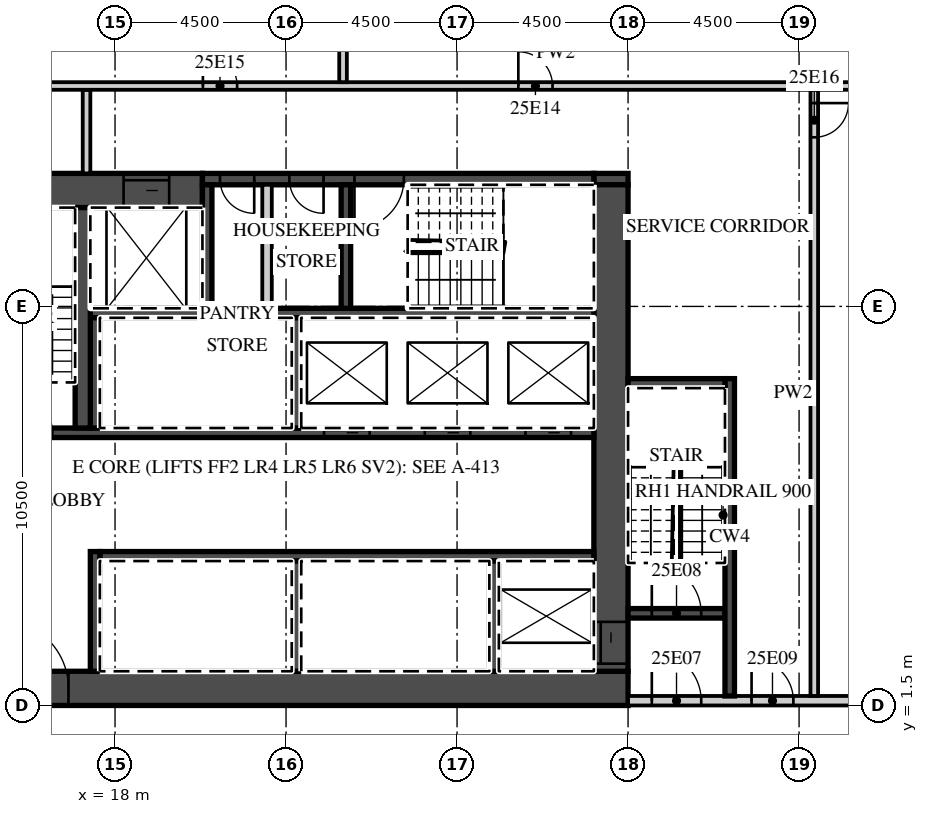
"""IFC4 building model, lengths in metres.
Left out: names, types, materials, properties, quantities, classifications, styles, units other than length and angle.
Written with IfcOpenShell. Run it as: python <this file> out.ifc"""

import sys

from ifc_helpers import new_model, si_unit, direction, frame, frame_2d, origin, place, context, subcontext, project, spatial, rectangle, extrude, element, fill, save


model = new_model("IFC4")
c1 = context("Model", 3, precision=1e-05, world=origin(), true_north=direction((0.0, 1.0)))
c2 = subcontext(c1, "Body", "Model", "MODEL_VIEW")
j1 = project(units=[si_unit("LENGTHUNIT", "METRE"), si_unit("PLANEANGLEUNIT", "RADIAN")], contexts=[c1])
p1 = place(None, origin())
s1 = spatial("IfcSite", under=j1, at=p1, CompositionType="ELEMENT")
p2 = place(p1, origin())
s2 = spatial("IfcBuilding", under=s1, at=p2, CompositionType="ELEMENT")
p3 = place(p2, frame((0.0, 0.0, 117.4)))
s3 = spatial("IfcBuildingStorey", under=s2, at=p3, CompositionType="ELEMENT", Elevation=117.4)
p4 = place(p3, frame((13.5, 1.95, 0.0), z_axis=(0.0, 0.0, 1.0), x_axis=(1.0, 0.0, 0.0)))
e1 = element("IfcWall", 1, at=p4, inside=s3, PredefinedType="SHEAR", context=c2, shape_type="SweptSolid", body=[
    extrude(rectangle(XDim=18.0, YDim=0.9, at=frame_2d((9.0, 0.0))), origin(), (0.0, 0.0, 1.0), 3.02),
])
p5 = place(p4, frame((1.475, 0.0, 0.0)))
e2 = element("IfcOpeningElement", 2, at=p5, cuts=e1, PredefinedType="OPENING", context=c2, shape_type="SweptSolid", body=[
    extrude(rectangle(XDim=1.8, YDim=2.1, at=frame_2d((0.9, 1.05))), frame((0.0, 0.46, 0.0), z_axis=(0.0, -1.0, 0.0), x_axis=(1.0, 0.0, 0.0)), (0.0, 0.0, 1.0), 0.92),
])
p6 = place(p3, frame((13.5, 15.05, 0.0), z_axis=(0.0, 0.0, 1.0), x_axis=(1.0, 0.0, 0.0)))
e3 = element("IfcWall", 3, at=p6, inside=s3, PredefinedType="SHEAR", context=c2, shape_type="SweptSolid", body=[
    extrude(rectangle(XDim=6.8, YDim=0.9, at=frame_2d((3.4, 0.0))), origin(), (0.0, 0.0, 1.0), 3.02),
])
p7 = place(p6, frame((4.725, 0.0, 0.0)))
e4 = element("IfcOpeningElement", 4, at=p7, cuts=e3, PredefinedType="OPENING", context=c2, shape_type="SweptSolid", body=[
    extrude(rectangle(XDim=1.2, YDim=2.1, at=frame_2d((0.6, 1.05))), frame((0.0, 0.46, 0.0), z_axis=(0.0, -1.0, 0.0), x_axis=(1.0, 0.0, 0.0)), (0.0, 0.0, 1.0), 0.92),
])
p8 = place(p3, frame((30.6, 15.35, 0.0), z_axis=(0.0, 0.0, 1.0), x_axis=(1.0, 0.0, 0.0)))
e5 = element("IfcWall", 5, at=p8, inside=s3, PredefinedType="SHEAR", context=c2, shape_type="SweptSolid", body=[
    extrude(rectangle(XDim=0.9, YDim=0.3, at=frame_2d((0.45, 0.0))), origin(), (0.0, 0.0, 1.0), 3.02),
])
p9 = place(p3, frame((20.3, 15.35, 0.0), z_axis=(0.0, 0.0, 1.0), x_axis=(1.0, 0.0, 0.0)))
e6 = element("IfcWall", 6, at=p9, inside=s3, PredefinedType="SHEAR", context=c2, shape_type="SweptSolid", body=[
    extrude(rectangle(XDim=10.3, YDim=0.3, at=frame_2d((5.15, 0.0))), origin(), (0.0, 0.0, 1.0), 3.02),
])
p10 = place(p9, frame((4.0, 0.0, 0.0)))
e7 = element("IfcOpeningElement", 7, at=p10, cuts=e6, PredefinedType="OPENING", context=c2, shape_type="SweptSolid", body=[
    extrude(rectangle(XDim=1.3, YDim=2.1, at=frame_2d((0.65, 1.05))), frame((0.0, 0.16, 0.0), z_axis=(0.0, -1.0, 0.0), x_axis=(1.0, 0.0, 0.0)), (0.0, 0.0, 1.0), 0.32),
])
p11 = place(p9, frame((2.288, 0.0, 0.0)))
e8 = element("IfcOpeningElement", 8, at=p11, cuts=e6, PredefinedType="OPENING", context=c2, shape_type="SweptSolid", body=[
    extrude(rectangle(XDim=0.9, YDim=2.1, at=frame_2d((0.45, 1.05))), frame((0.0, 0.16, 0.0), z_axis=(0.0, -1.0, 0.0), x_axis=(1.0, 0.0, 0.0)), (0.0, 0.0, 1.0), 0.32),
])
p12 = place(p9, frame((0.462, 0.0, 0.0)))
e9 = element("IfcOpeningElement", 9, at=p12, cuts=e6, PredefinedType="OPENING", context=c2, shape_type="SweptSolid", body=[
    extrude(rectangle(XDim=0.9, YDim=2.1, at=frame_2d((0.45, 1.05))), frame((0.0, 0.16, 0.0), z_axis=(0.0, -1.0, 0.0), x_axis=(1.0, 0.0, 0.0)), (0.0, 0.0, 1.0), 0.32),
])
p13 = place(p3, frame((31.05, 2.4, 0.0), z_axis=(0.0, 0.0, 1.0), x_axis=(0.0, 1.0, 0.0)))
e10 = element("IfcWall", 10, at=p13, inside=s3, PredefinedType="SHEAR", context=c2, shape_type="SweptSolid", body=[
    extrude(rectangle(XDim=12.8, YDim=0.9, at=frame_2d((6.4, 0.0))), origin(), (0.0, 0.0, 1.0), 3.02),
])
p14 = place(p13, frame((0.2, 0.0, 0.0)))
e11 = element("IfcOpeningElement", 11, at=p14, cuts=e10, PredefinedType="OPENING", context=c2, shape_type="SweptSolid", body=[
    extrude(rectangle(XDim=1.1, YDim=2.1, at=frame_2d((0.55, 1.05))), frame((0.0, 0.46, 0.0), z_axis=(0.0, -1.0, 0.0), x_axis=(1.0, 0.0, 0.0)), (0.0, 0.0, 1.0), 0.92),
])
p15 = place(p3, frame((17.6, 5.425, 0.0), z_axis=(0.0, 0.0, 1.0), x_axis=(1.0, 0.0, 0.0)))
e12 = element("IfcWall", 12, at=p15, inside=s3, PredefinedType="SHEAR", context=c2, shape_type="SweptSolid", body=[
    extrude(rectangle(XDim=13.0, YDim=0.25, at=frame_2d((6.5, 0.0))), origin(), (0.0, 0.0, 1.0), 3.02),
])
p16 = place(p3, frame((17.475, 2.4, 0.0), z_axis=(0.0, 0.0, 1.0), x_axis=(0.0, 1.0, 0.0)))
e13 = element("IfcWall", 13, at=p16, inside=s3, PredefinedType="SHEAR", context=c2, shape_type="SweptSolid", body=[
    extrude(rectangle(XDim=3.15, YDim=0.25, at=frame_2d((1.575, 0.0))), origin(), (0.0, 0.0, 1.0), 3.02),
])
for number, where, z_axis, x_axis in (
    (14, (27.975, 2.4, 0.0), (0.0, 0.0, 1.0), (0.0, 1.0, 0.0)),
    (15, (22.775, 2.4, 0.0), (0.0, 0.0, 1.0), (0.0, 1.0, 0.0)),
):
    element("IfcWall", number, at=place(p3, frame(where, z_axis=z_axis, x_axis=x_axis)), inside=s3, PredefinedType="SHEAR", context=c2, shape_type="SweptSolid", body=[
        extrude(rectangle(XDim=2.9, YDim=0.25, at=frame_2d((1.45, 0.0))), origin(), (0.0, 0.0, 1.0), 3.02),
    ])
p17 = place(p3, frame((14.4, 8.675, 0.0), z_axis=(0.0, 0.0, 1.0), x_axis=(1.0, 0.0, 0.0)))
e16 = element("IfcWall", 16, at=p17, inside=s3, PredefinedType="SHEAR", context=c2, shape_type="SweptSolid", body=[
    extrude(rectangle(XDim=16.2, YDim=0.25, at=frame_2d((8.1, 0.0))), origin(), (0.0, 0.0, 1.0), 3.02),
])
p18 = place(p17, frame((14.4, 0.0, 0.0)))
e17 = element("IfcOpeningElement", 17, at=p18, cuts=e16, PredefinedType="OPENING", context=c2, shape_type="SweptSolid", body=[
    extrude(rectangle(XDim=1.2, YDim=2.1, at=frame_2d((0.6, 1.05))), frame((0.0, 0.135, 0.0), z_axis=(0.0, -1.0, 0.0), x_axis=(1.0, 0.0, 0.0)), (0.0, 0.0, 1.0), 0.27),
])
p19 = place(p17, frame((11.75, 0.0, 0.0)))
e18 = element("IfcOpeningElement", 18, at=p19, cuts=e16, PredefinedType="OPENING", context=c2, shape_type="SweptSolid", body=[
    extrude(rectangle(XDim=1.2, YDim=2.1, at=frame_2d((0.6, 1.05))), frame((0.0, 0.135, 0.0), z_axis=(0.0, -1.0, 0.0), x_axis=(1.0, 0.0, 0.0)), (0.0, 0.0, 1.0), 0.27),
])
p20 = place(p17, frame((9.1, 0.0, 0.0)))
e19 = element("IfcOpeningElement", 19, at=p20, cuts=e16, PredefinedType="OPENING", context=c2, shape_type="SweptSolid", body=[
    extrude(rectangle(XDim=1.2, YDim=2.1, at=frame_2d((0.6, 1.05))), frame((0.0, 0.135, 0.0), z_axis=(0.0, -1.0, 0.0), x_axis=(1.0, 0.0, 0.0)), (0.0, 0.0, 1.0), 0.27),
])
p21 = place(p17, frame((0.65, 0.0, 0.0)))
e20 = element("IfcOpeningElement", 20, at=p21, cuts=e16, PredefinedType="OPENING", context=c2, shape_type="SweptSolid", body=[
    extrude(rectangle(XDim=1.3, YDim=2.1, at=frame_2d((0.65, 1.05))), frame((0.0, 0.135, 0.0), z_axis=(0.0, -1.0, 0.0), x_axis=(1.0, 0.0, 0.0)), (0.0, 0.0, 1.0), 0.27),
])
p22 = place(p3, frame((17.35, 11.825, 0.0), z_axis=(0.0, 0.0, 1.0), x_axis=(1.0, 0.0, 0.0)))
e21 = element("IfcWall", 21, at=p22, inside=s3, PredefinedType="SHEAR", context=c2, shape_type="SweptSolid", body=[
    extrude(rectangle(XDim=13.25, YDim=0.25, at=frame_2d((6.625, 0.0))), origin(), (0.0, 0.0, 1.0), 3.02),
])
for number, where, z_axis, x_axis in (
    (22, (17.475, 8.8, 0.0), (0.0, 0.0, 1.0), (0.0, 1.0, 0.0)),
    (23, (22.775, 8.8, 0.0), (0.0, 0.0, 1.0), (0.0, 1.0, 0.0)),
):
    element("IfcWall", number, at=place(p3, frame(where, z_axis=z_axis, x_axis=x_axis)), inside=s3, PredefinedType="SHEAR", context=c2, shape_type="SweptSolid", body=[
        extrude(rectangle(XDim=2.9, YDim=0.25, at=frame_2d((1.45, 0.0))), origin(), (0.0, 0.0, 1.0), 3.02),
    ])
p23 = place(p3, frame((17.15, 8.8, 0.0), z_axis=(0.0, 0.0, 1.0), x_axis=(0.0, 1.0, 0.0)))
e24 = element("IfcWall", 24, at=p23, inside=s3, PredefinedType="SHEAR", context=c2, shape_type="SweptSolid", body=[
    extrude(rectangle(XDim=5.8, YDim=0.4, at=frame_2d((2.9, 0.0))), origin(), (0.0, 0.0, 1.0), 3.02),
])
for number, where, z_axis, x_axis in (
    (25, (20.425, 11.95, 0.0), (0.0, 0.0, 1.0), (0.0, 1.0, 0.0)),
    (26, (24.075, 11.95, 0.0), (0.0, 0.0, 1.0), (0.0, 1.0, 0.0)),
):
    element("IfcWall", number, at=place(p3, frame(where, z_axis=z_axis, x_axis=x_axis)), inside=s3, PredefinedType="SHEAR", context=c2, shape_type="SweptSolid", body=[
        extrude(rectangle(XDim=3.25, YDim=0.25, at=frame_2d((1.625, 0.0))), origin(), (0.0, 0.0, 1.0), 3.02),
    ])
p24 = place(p3, frame((22.0, 11.95, 0.0), z_axis=(0.0, 0.0, 1.0), x_axis=(0.0, 1.0, 0.0)))
e27 = element("IfcWall", 27, at=p24, inside=s3, PredefinedType="PARTITIONING", context=c2, shape_type="SweptSolid", body=[
    extrude(rectangle(XDim=3.25, YDim=0.25, at=frame_2d((1.625, 0.0))), origin(), (0.0, 0.0, 1.0), 3.02),
])
p25 = place(p3, frame((31.5, 1.625, 0.0), z_axis=(0.0, 0.0, 1.0), x_axis=(1.0, 0.0, 0.0)))
e28 = element("IfcWall", 28, at=p25, inside=s3, PredefinedType="PARTITIONING", context=c2, shape_type="SweptSolid", body=[
    extrude(rectangle(XDim=15.65, YDim=0.25, at=frame_2d((7.825, 0.0))), origin(), (0.0, 0.0, 1.0), 3.02),
])
p26 = place(p25, frame((0.625, 0.0, 0.0)))
e29 = element("IfcOpeningElement", 29, at=p26, cuts=e28, PredefinedType="OPENING", context=c2, shape_type="SweptSolid", body=[
    extrude(rectangle(XDim=1.3, YDim=2.1, at=frame_2d((0.65, 1.05))), frame((0.0, 0.135, 0.0), z_axis=(0.0, -1.0, 0.0), x_axis=(1.0, 0.0, 0.0)), (0.0, 0.0, 1.0), 0.27),
])
p27 = place(p25, frame((3.25, 0.0, 0.0)))
e30 = element("IfcOpeningElement", 30, at=p27, cuts=e28, PredefinedType="OPENING", context=c2, shape_type="SweptSolid", body=[
    extrude(rectangle(XDim=1.1, YDim=2.1, at=frame_2d((0.55, 1.05))), frame((0.0, 0.135, 0.0), z_axis=(0.0, -1.0, 0.0), x_axis=(1.0, 0.0, 0.0)), (0.0, 0.0, 1.0), 0.27),
])
p28 = place(p3, frame((31.5, 3.925, 0.0), z_axis=(0.0, 0.0, 1.0), x_axis=(1.0, 0.0, 0.0)))
e31 = element("IfcWall", 31, at=p28, inside=s3, PredefinedType="SHEAR", context=c2, shape_type="SweptSolid", body=[
    extrude(rectangle(XDim=2.55, YDim=0.25, at=frame_2d((1.275, 0.0))), origin(), (0.0, 0.0, 1.0), 3.02),
])
p29 = place(p28, frame((0.625, 0.0, 0.0)))
e32 = element("IfcOpeningElement", 32, at=p29, cuts=e31, PredefinedType="OPENING", context=c2, shape_type="SweptSolid", body=[
    extrude(rectangle(XDim=1.3, YDim=2.1, at=frame_2d((0.65, 1.05))), frame((0.0, 0.135, 0.0), z_axis=(0.0, -1.0, 0.0), x_axis=(1.0, 0.0, 0.0)), (0.0, 0.0, 1.0), 0.27),
])
p30 = place(p3, frame((34.175, 1.75, 0.0), z_axis=(0.0, 0.0, 1.0), x_axis=(0.0, 1.0, 0.0)))
e33 = element("IfcWall", 33, at=p30, inside=s3, PredefinedType="SHEAR", context=c2, shape_type="SweptSolid", body=[
    extrude(rectangle(XDim=8.35, YDim=0.25, at=frame_2d((4.175, 0.0))), origin(), (0.0, 0.0, 1.0), 3.02),
])
p31 = place(p3, frame((31.5, 9.975, 0.0), z_axis=(0.0, 0.0, 1.0), x_axis=(1.0, 0.0, 0.0)))
e34 = element("IfcWall", 34, at=p31, inside=s3, PredefinedType="SHEAR", context=c2, shape_type="SweptSolid", body=[
    extrude(rectangle(XDim=2.55, YDim=0.25, at=frame_2d((1.275, 0.0))), origin(), (0.0, 0.0, 1.0), 3.02),
])
p32 = place(p3, frame((17.25, 15.5, 0.0), z_axis=(0.0, 0.0, 1.0), x_axis=(0.0, 1.0, 0.0)))
e35 = element("IfcWall", 35, at=p32, inside=s3, PredefinedType="PARTITIONING", context=c2, shape_type="SweptSolid", body=[
    extrude(rectangle(XDim=2.2, YDim=0.2, at=frame_2d((1.1, 0.0))), origin(), (0.0, 0.0, 1.0), 3.02),
])
p33 = place(p3, frame((36.4, 1.75, 0.0), z_axis=(0.0, 0.0, 1.0), x_axis=(0.0, 1.0, 0.0)))
e36 = element("IfcWall", 36, at=p33, inside=s3, PredefinedType="PARTITIONING", context=c2, shape_type="SweptSolid", body=[
    extrude(rectangle(XDim=15.95, YDim=0.2, at=frame_2d((7.975, 0.0))), origin(), (0.0, 0.0, 1.0), 3.02),
])
p34 = place(p33, frame((14.7, 0.0, 0.0)))
e37 = element("IfcOpeningElement", 37, at=p34, cuts=e36, PredefinedType="OPENING", context=c2, shape_type="SweptSolid", body=[
    extrude(rectangle(XDim=0.9, YDim=2.1, at=frame_2d((0.45, 1.05))), frame((0.0, 0.11, 0.0), z_axis=(0.0, -1.0, 0.0), x_axis=(1.0, 0.0, 0.0)), (0.0, 0.0, 1.0), 0.22),
])
p35 = place(p3, frame((13.6, 17.8, 0.0), z_axis=(0.0, 0.0, 1.0), x_axis=(1.0, 0.0, 0.0)))
e38 = element("IfcWall", 38, at=p35, inside=s3, PredefinedType="PARTITIONING", context=c2, shape_type="SweptSolid", body=[
    extrude(rectangle(XDim=31.993, YDim=0.2, at=frame_2d((15.997, 0.0))), origin(), (0.0, 0.0, 1.0), 3.02),
])
p36 = place(p35, frame((15.012, 0.0, 0.0)))
e39 = element("IfcOpeningElement", 39, at=p36, cuts=e38, PredefinedType="OPENING", context=c2, shape_type="SweptSolid", body=[
    extrude(rectangle(XDim=0.9, YDim=2.1, at=frame_2d((0.45, 1.05))), frame((0.0, 0.11, 0.0), z_axis=(0.0, -1.0, 0.0), x_axis=(1.0, 0.0, 0.0)), (0.0, 0.0, 1.0), 0.22),
])
p37 = place(p35, frame((6.712, 0.0, 0.0)))
e40 = element("IfcOpeningElement", 40, at=p37, cuts=e38, PredefinedType="OPENING", context=c2, shape_type="SweptSolid", body=[
    extrude(rectangle(XDim=0.9, YDim=2.1, at=frame_2d((0.45, 1.05))), frame((0.0, 0.11, 0.0), z_axis=(0.0, -1.0, 0.0), x_axis=(1.0, 0.0, 0.0)), (0.0, 0.0, 1.0), 0.22),
])
p38 = place(p3, frame((24.0, 17.9, 0.0), z_axis=(0.0, 0.0, 1.0), x_axis=(0.0, 1.0, 0.0)))
e41 = element("IfcWall", 41, at=p38, inside=s3, PredefinedType="PARTITIONING", context=c2, shape_type="SweptSolid", body=[
    extrude(rectangle(XDim=5.774, YDim=0.2, at=frame_2d((2.887, 0.0))), origin(), (0.0, 0.0, 1.0), 3.02),
])
p39 = place(p18, origin())
e42 = element("IfcDoor", 42, at=p39, inside=s3, OperationType="SLIDING_TO_LEFT", PredefinedType="DOOR", context=c2, shape_type="SweptSolid", body=[
    extrude(rectangle(XDim=1.2, YDim=2.1, at=frame_2d((0.6, 1.05))), frame((0.0, 0.025, 0.0), z_axis=(0.0, -1.0, 0.0), x_axis=(1.0, 0.0, 0.0)), (0.0, 0.0, 1.0), 0.05),
])
fill(e17, e42)
p40 = place(p19, origin())
e43 = element("IfcDoor", 43, at=p40, inside=s3, OperationType="SLIDING_TO_RIGHT", PredefinedType="DOOR", context=c2, shape_type="SweptSolid", body=[
    extrude(rectangle(XDim=1.2, YDim=2.1, at=frame_2d((0.6, 1.05))), frame((0.0, 0.025, 0.0), z_axis=(0.0, -1.0, 0.0), x_axis=(1.0, 0.0, 0.0)), (0.0, 0.0, 1.0), 0.05),
])
fill(e18, e43)
p41 = place(p20, origin())
e44 = element("IfcDoor", 44, at=p41, inside=s3, OperationType="SLIDING_TO_RIGHT", PredefinedType="DOOR", context=c2, shape_type="SweptSolid", body=[
    extrude(rectangle(XDim=1.2, YDim=2.1, at=frame_2d((0.6, 1.05))), frame((0.0, 0.025, 0.0), z_axis=(0.0, -1.0, 0.0), x_axis=(1.0, 0.0, 0.0)), (0.0, 0.0, 1.0), 0.05),
])
fill(e19, e44)
p42 = place(p7, origin())
e45 = element("IfcDoor", 45, at=p42, inside=s3, OperationType="SLIDING_TO_LEFT", PredefinedType="DOOR", context=c2, shape_type="SweptSolid", body=[
    extrude(rectangle(XDim=1.2, YDim=2.1, at=frame_2d((0.6, 1.05))), frame((0.0, 0.025, 0.0), z_axis=(0.0, -1.0, 0.0), x_axis=(1.0, 0.0, 0.0)), (0.0, 0.0, 1.0), 0.05),
])
fill(e4, e45)
p43 = place(p14, origin())
e46 = element("IfcDoor", 46, at=p43, inside=s3, OperationType="SLIDING_TO_LEFT", PredefinedType="DOOR", context=c2, shape_type="SweptSolid", body=[
    extrude(rectangle(XDim=1.1, YDim=2.1, at=frame_2d((0.55, 1.05))), frame((0.0, 0.025, 0.0), z_axis=(0.0, -1.0, 0.0), x_axis=(1.0, 0.0, 0.0)), (0.0, 0.0, 1.0), 0.05),
])
fill(e11, e46)
p44 = place(p5, origin())
e47 = element("IfcDoor", 47, at=p44, inside=s3, OperationType="DOUBLE_DOOR_DOUBLE_SWING", PredefinedType="DOOR", context=c2, shape_type="SweptSolid", body=[
    extrude(rectangle(XDim=1.8, YDim=2.1, at=frame_2d((0.9, 1.05))), frame((0.0, 0.025, 0.0), z_axis=(0.0, -1.0, 0.0), x_axis=(1.0, 0.0, 0.0)), (0.0, 0.0, 1.0), 0.05),
])
fill(e2, e47)
p45 = place(p26, origin())
e48 = element("IfcDoor", 48, at=p45, inside=s3, OperationType="SINGLE_SWING_LEFT", PredefinedType="DOOR", context=c2, shape_type="SweptSolid", body=[
    extrude(rectangle(XDim=1.3, YDim=2.1, at=frame_2d((0.65, 1.05))), frame((0.0, 0.025, 0.0), z_axis=(0.0, -1.0, 0.0), x_axis=(1.0, 0.0, 0.0)), (0.0, 0.0, 1.0), 0.05),
])
fill(e29, e48)
p46 = place(p29, origin())
e49 = element("IfcDoor", 49, at=p46, inside=s3, OperationType="SINGLE_SWING_LEFT", PredefinedType="DOOR", context=c2, shape_type="SweptSolid", body=[
    extrude(rectangle(XDim=1.3, YDim=2.1, at=frame_2d((0.65, 1.05))), frame((0.0, 0.025, 0.0), z_axis=(0.0, -1.0, 0.0), x_axis=(1.0, 0.0, 0.0)), (0.0, 0.0, 1.0), 0.05),
])
fill(e32, e49)
p47 = place(p27, origin())
e50 = element("IfcDoor", 50, at=p47, inside=s3, OperationType="SINGLE_SWING_LEFT", PredefinedType="DOOR", context=c2, shape_type="SweptSolid", body=[
    extrude(rectangle(XDim=1.1, YDim=2.1, at=frame_2d((0.55, 1.05))), frame((0.0, 0.025, 0.0), z_axis=(0.0, -1.0, 0.0), x_axis=(1.0, 0.0, 0.0)), (0.0, 0.0, 1.0), 0.05),
])
fill(e30, e50)
p48 = place(p10, origin())
e51 = element("IfcDoor", 51, at=p48, inside=s3, OperationType="SINGLE_SWING_LEFT", PredefinedType="DOOR", context=c2, shape_type="SweptSolid", body=[
    extrude(rectangle(XDim=1.3, YDim=2.1, at=frame_2d((0.65, 1.05))), frame((0.0, 0.025, 0.0), z_axis=(0.0, -1.0, 0.0), x_axis=(1.0, 0.0, 0.0)), (0.0, 0.0, 1.0), 0.05),
])
fill(e7, e51)
p49 = place(p11, origin())
e52 = element("IfcDoor", 52, at=p49, inside=s3, OperationType="SINGLE_SWING_RIGHT", PredefinedType="DOOR", context=c2, shape_type="SweptSolid", body=[
    extrude(rectangle(XDim=0.9, YDim=2.1, at=frame_2d((0.45, 1.05))), frame((0.0, 0.025, 0.0), z_axis=(0.0, -1.0, 0.0), x_axis=(1.0, 0.0, 0.0)), (0.0, 0.0, 1.0), 0.05),
])
fill(e8, e52)
p50 = place(p12, origin())
e53 = element("IfcDoor", 53, at=p50, inside=s3, OperationType="SINGLE_SWING_RIGHT", PredefinedType="DOOR", context=c2, shape_type="SweptSolid", body=[
    extrude(rectangle(XDim=0.9, YDim=2.1, at=frame_2d((0.45, 1.05))), frame((0.0, 0.025, 0.0), z_axis=(0.0, -1.0, 0.0), x_axis=(1.0, 0.0, 0.0)), (0.0, 0.0, 1.0), 0.05),
])
fill(e9, e53)
p51 = place(p36, origin())
e54 = element("IfcDoor", 54, at=p51, inside=s3, OperationType="SINGLE_SWING_LEFT", PredefinedType="DOOR", context=c2, shape_type="SweptSolid", body=[
    extrude(rectangle(XDim=0.9, YDim=2.1, at=frame_2d((0.45, 1.05))), frame((0.0, 0.025, 0.0), z_axis=(0.0, -1.0, 0.0), x_axis=(1.0, 0.0, 0.0)), (0.0, 0.0, 1.0), 0.05),
])
fill(e39, e54)
p52 = place(p37, origin())
e55 = element("IfcDoor", 55, at=p52, inside=s3, OperationType="SINGLE_SWING_LEFT", PredefinedType="DOOR", context=c2, shape_type="SweptSolid", body=[
    extrude(rectangle(XDim=0.9, YDim=2.1, at=frame_2d((0.45, 1.05))), frame((0.0, 0.025, 0.0), z_axis=(0.0, -1.0, 0.0), x_axis=(1.0, 0.0, 0.0)), (0.0, 0.0, 1.0), 0.05),
])
fill(e40, e55)
p53 = place(p34, origin())
e56 = element("IfcDoor", 56, at=p53, inside=s3, OperationType="SINGLE_SWING_RIGHT", PredefinedType="DOOR", context=c2, shape_type="SweptSolid", body=[
    extrude(rectangle(XDim=0.9, YDim=2.1, at=frame_2d((0.45, 1.05))), frame((0.0, 0.025, 0.0), z_axis=(0.0, -1.0, 0.0), x_axis=(1.0, 0.0, 0.0)), (0.0, 0.0, 1.0), 0.05),
])
fill(e37, e56)
save(model, sys.argv[1])
